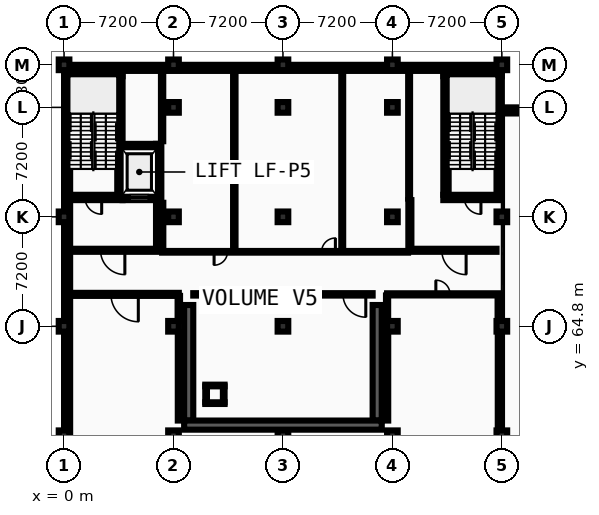
"""IFC4 building model, lengths in metres.
Left out: names, types, materials, properties, quantities, classifications, styles, units other than length and angle.
Written with IfcOpenShell. Run it as: python <this file> out.ifc"""

import sys

from ifc_helpers import new_model, si_unit, direction, frame, frame_2d, origin, origin_2d, place, context, subcontext, project, spatial, rectangle, extrude, element, fill, save


model = new_model("IFC4")
c1 = context("Model", 3, precision=1e-05, world=origin(), true_north=direction((0.0, 1.0)))
c2 = subcontext(c1, "Body", "Model", "MODEL_VIEW")
j1 = project(units=[si_unit("LENGTHUNIT", "METRE"), si_unit("PLANEANGLEUNIT", "RADIAN")], contexts=[c1])
p1 = place(None, origin())
s1 = spatial("IfcSite", under=j1, at=p1, CompositionType="ELEMENT")
p2 = place(p1, origin())
s2 = spatial("IfcBuilding", under=s1, at=p2, CompositionType="ELEMENT")
p3 = place(p2, frame((0.0, 0.0, -4.8)))
s3 = spatial("IfcBuildingStorey", under=s2, at=p3, CompositionType="ELEMENT", Elevation=-4.8)
for number, where, z_axis, x_axis in (
    (1, (0.0, 57.6, 0.0), (0.0, 0.0, 1.0), (1.0, 0.0, 0.0)),
    (2, (0.0, 64.8, 0.0), (0.0, 0.0, 1.0), (1.0, 0.0, 0.0)),
    (3, (0.0, 72.0, 0.0), (0.0, 0.0, 1.0), (1.0, 0.0, 0.0)),
    (4, (0.0, 82.0, 0.0), (0.0, 0.0, 1.0), (1.0, 0.0, 0.0)),
    (5, (7.2, 57.6, 0.0), (0.0, 0.0, 1.0), (1.0, 0.0, 0.0)),
    (6, (7.2, 64.8, 0.0), (0.0, 0.0, 1.0), (1.0, 0.0, 0.0)),
    (7, (7.2, 72.0, 0.0), (0.0, 0.0, 1.0), (1.0, 0.0, 0.0)),
    (8, (7.2, 79.2, 0.0), (0.0, 0.0, 1.0), (1.0, 0.0, 0.0)),
    (9, (7.2, 82.0, 0.0), (0.0, 0.0, 1.0), (1.0, 0.0, 0.0)),
    (10, (14.4, 57.6, 0.0), (0.0, 0.0, 1.0), (1.0, 0.0, 0.0)),
    (11, (14.4, 64.8, 0.0), (0.0, 0.0, 1.0), (1.0, 0.0, 0.0)),
    (12, (14.4, 72.0, 0.0), (0.0, 0.0, 1.0), (1.0, 0.0, 0.0)),
    (13, (14.4, 79.2, 0.0), (0.0, 0.0, 1.0), (1.0, 0.0, 0.0)),
    (14, (14.4, 82.0, 0.0), (0.0, 0.0, 1.0), (1.0, 0.0, 0.0)),
    (15, (21.6, 57.6, 0.0), (0.0, 0.0, 1.0), (1.0, 0.0, 0.0)),
    (16, (21.6, 64.8, 0.0), (0.0, 0.0, 1.0), (1.0, 0.0, 0.0)),
    (17, (21.6, 72.0, 0.0), (0.0, 0.0, 1.0), (1.0, 0.0, 0.0)),
    (18, (21.6, 79.2, 0.0), (0.0, 0.0, 1.0), (1.0, 0.0, 0.0)),
    (19, (21.6, 82.0, 0.0), (0.0, 0.0, 1.0), (1.0, 0.0, 0.0)),
    (20, (28.8, 57.6, 0.0), (0.0, 0.0, 1.0), (1.0, 0.0, 0.0)),
    (21, (28.8, 64.8, 0.0), (0.0, 0.0, 1.0), (1.0, 0.0, 0.0)),
    (22, (28.8, 72.0, 0.0), (0.0, 0.0, 1.0), (1.0, 0.0, 0.0)),
    (23, (28.8, 82.0, 0.0), (0.0, 0.0, 1.0), (1.0, 0.0, 0.0)),
):
    element("IfcColumn", number, at=place(p3, frame(where, z_axis=z_axis, x_axis=x_axis)), inside=s3, PredefinedType="COLUMN", context=c2, shape_type="SweptSolid", body=[
        extrude(rectangle(XDim=0.7, YDim=0.7, at=origin_2d()), origin(), (0.0, 0.0, 1.0), 4.8),
    ])
p4 = place(p3, frame((36.4, 79.0, 0.0), z_axis=(0.0, 0.0, 1.0), x_axis=(-1.0, 0.0, 0.0)))
e24 = element("IfcWall", 24, at=p4, inside=s3, PredefinedType="USERDEFINED", context=c2, shape_type="SweptSolid", body=[
    extrude(rectangle(XDim=8.0, YDim=0.4, at=frame_2d((4.0, 0.0))), origin(), (0.0, 0.0, 1.0), 4.545),
])
p5 = place(p3, frame((28.8, 81.8, 0.0), z_axis=(0.0, 0.0, 1.0), x_axis=(-1.0, 0.0, 0.0)))
e25 = element("IfcWall", 25, at=p5, inside=s3, PredefinedType="USERDEFINED", context=c2, shape_type="SweptSolid", body=[
    extrude(rectangle(XDim=28.8, YDim=0.4, at=frame_2d((14.4, 0.0))), origin(), (0.0, 0.0, 1.0), 4.545),
])
p6 = place(p3, frame((0.2, 81.6, 0.0), z_axis=(0.0, 0.0, 1.0), x_axis=(0.0, -1.0, 0.0)))
e26 = element("IfcWall", 26, at=p6, inside=s3, PredefinedType="USERDEFINED", context=c2, shape_type="SweptSolid", body=[
    extrude(rectangle(XDim=81.2, YDim=0.4, at=frame_2d((40.6, 0.0))), origin(), (0.0, 0.0, 1.0), 4.545),
])
for number, where, z_axis, x_axis in (
    (27, (8.2, 58.6, 0.0), (0.0, 0.0, 1.0), (0.0, 1.0, 0.0)),
    (28, (20.6, 58.6, 0.0), (0.0, 0.0, 1.0), (0.0, 1.0, 0.0)),
):
    element("IfcWall", number, at=place(p3, frame(where, z_axis=z_axis, x_axis=x_axis)), inside=s3, PredefinedType="SHEAR", context=c2, shape_type="SweptSolid", body=[
        extrude(rectangle(XDim=7.6, YDim=0.6, at=frame_2d((3.8, 0.0))), origin(), (0.0, 0.0, 1.0), 4.5),
    ])
p7 = place(p3, frame((7.9, 58.3, 0.0), z_axis=(0.0, 0.0, 1.0), x_axis=(1.0, 0.0, 0.0)))
e29 = element("IfcWall", 29, at=p7, inside=s3, PredefinedType="SHEAR", context=c2, shape_type="SweptSolid", body=[
    extrude(rectangle(XDim=13.0, YDim=0.6, at=frame_2d((6.5, 0.0))), origin(), (0.0, 0.0, 1.0), 4.5),
])
p8 = place(p3, frame((0.0, 73.275, 0.0), z_axis=(0.0, 0.0, 1.0), x_axis=(1.0, 0.0, 0.0)))
e30 = element("IfcWall", 30, at=p8, inside=s3, PredefinedType="SHEAR", context=c2, shape_type="SweptSolid", body=[
    extrude(rectangle(XDim=3.85, YDim=0.35, at=frame_2d((1.925, 0.0))), origin(), (0.0, 0.0, 1.0), 4.545),
])
p9 = place(p8, frame((1.375, 0.0, 0.0)))
e31 = element("IfcOpeningElement", 31, at=p9, cuts=e30, PredefinedType="OPENING", context=c2, shape_type="SweptSolid", body=[
    extrude(rectangle(XDim=1.1, YDim=2.15, at=frame_2d((0.55, 1.075))), frame((0.0, 0.185, 0.0), z_axis=(0.0, -1.0, 0.0), x_axis=(1.0, 0.0, 0.0)), (0.0, 0.0, 1.0), 0.37),
])
p10 = place(p3, frame((0.0, 81.425, 0.0), z_axis=(0.0, 0.0, 1.0), x_axis=(1.0, 0.0, 0.0)))
e32 = element("IfcWall", 32, at=p10, inside=s3, PredefinedType="SHEAR", context=c2, shape_type="SweptSolid", body=[
    extrude(rectangle(XDim=3.85, YDim=0.35, at=frame_2d((1.925, 0.0))), origin(), (0.0, 0.0, 1.0), 4.545),
])
p11 = place(p3, frame((3.675, 73.45, 0.0), z_axis=(0.0, 0.0, 1.0), x_axis=(0.0, 1.0, 0.0)))
e33 = element("IfcWall", 33, at=p11, inside=s3, PredefinedType="SHEAR", context=c2, shape_type="SweptSolid", body=[
    extrude(rectangle(XDim=7.8, YDim=0.35, at=frame_2d((3.9, 0.0))), origin(), (0.0, 0.0, 1.0), 4.545),
])
p12 = place(p3, frame((3.85, 73.275, 0.0), z_axis=(0.0, 0.0, 1.0), x_axis=(1.0, 0.0, 0.0)))
e34 = element("IfcWall", 34, at=p12, inside=s3, PredefinedType="SHEAR", context=c2, shape_type="SweptSolid", body=[
    extrude(rectangle(XDim=2.2, YDim=0.35, at=frame_2d((1.1, 0.0))), origin(), (0.0, 0.0, 1.0), 4.545),
])
p13 = place(p12, frame((0.5, 0.0, 0.0)))
e35 = element("IfcOpeningElement", 35, at=p13, cuts=e34, PredefinedType="OPENING", context=c2, shape_type="SweptSolid", body=[
    extrude(rectangle(XDim=1.2, YDim=2.2, at=frame_2d((0.6, 1.1))), frame((0.0, 0.185, 0.0), z_axis=(0.0, -1.0, 0.0), x_axis=(1.0, 0.0, 0.0)), (0.0, 0.0, 1.0), 0.37),
])
p14 = place(p3, frame((3.85, 76.625, 0.0), z_axis=(0.0, 0.0, 1.0), x_axis=(1.0, 0.0, 0.0)))
e36 = element("IfcWall", 36, at=p14, inside=s3, PredefinedType="SHEAR", context=c2, shape_type="SweptSolid", body=[
    extrude(rectangle(XDim=2.2, YDim=0.35, at=frame_2d((1.1, 0.0))), origin(), (0.0, 0.0, 1.0), 4.545),
])
p15 = place(p3, frame((6.225, 73.1, 0.0), z_axis=(0.0, 0.0, 1.0), x_axis=(0.0, 1.0, 0.0)))
e37 = element("IfcWall", 37, at=p15, inside=s3, PredefinedType="SHEAR", context=c2, shape_type="SweptSolid", body=[
    extrude(rectangle(XDim=3.7, YDim=0.35, at=frame_2d((1.85, 0.0))), origin(), (0.0, 0.0, 1.0), 4.545),
])
p16 = place(p3, frame((0.35, 69.8, 0.0), z_axis=(0.0, 0.0, 1.0), x_axis=(1.0, 0.0, 0.0)))
e38 = element("IfcWall", 38, at=p16, inside=s3, PredefinedType="PARTITIONING", context=c2, shape_type="SweptSolid", body=[
    extrude(rectangle(XDim=5.7, YDim=0.2, at=frame_2d((2.85, 0.0))), origin(), (0.0, 0.0, 1.0), 4.545),
])
p17 = place(p16, frame((2.05, 0.0, 0.0)))
e39 = element("IfcOpeningElement", 39, at=p17, cuts=e38, PredefinedType="OPENING", context=c2, shape_type="SweptSolid", body=[
    extrude(rectangle(XDim=1.6, YDim=2.2, at=frame_2d((0.8, 1.1))), frame((0.0, 0.11, 0.0), z_axis=(0.0, -1.0, 0.0), x_axis=(1.0, 0.0, 0.0)), (0.0, 0.0, 1.0), 0.22),
])
p18 = place(p3, frame((6.15, 69.9, 0.0), z_axis=(0.0, 0.0, 1.0), x_axis=(0.0, 1.0, 0.0)))
e40 = element("IfcWall", 40, at=p18, inside=s3, PredefinedType="PARTITIONING", context=c2, shape_type="SweptSolid", body=[
    extrude(rectangle(XDim=3.2, YDim=0.2, at=frame_2d((1.6, 0.0))), origin(), (0.0, 0.0, 1.0), 4.545),
])
p19 = place(p3, frame((24.95, 73.275, 0.0), z_axis=(0.0, 0.0, 1.0), x_axis=(1.0, 0.0, 0.0)))
e41 = element("IfcWall", 41, at=p19, inside=s3, PredefinedType="SHEAR", context=c2, shape_type="SweptSolid", body=[
    extrude(rectangle(XDim=3.85, YDim=0.35, at=frame_2d((1.925, 0.0))), origin(), (0.0, 0.0, 1.0), 4.545),
])
p20 = place(p19, frame((1.375, 0.0, 0.0)))
e42 = element("IfcOpeningElement", 42, at=p20, cuts=e41, PredefinedType="OPENING", context=c2, shape_type="SweptSolid", body=[
    extrude(rectangle(XDim=1.1, YDim=2.15, at=frame_2d((0.55, 1.075))), frame((0.0, 0.185, 0.0), z_axis=(0.0, -1.0, 0.0), x_axis=(1.0, 0.0, 0.0)), (0.0, 0.0, 1.0), 0.37),
])
p21 = place(p3, frame((24.95, 81.425, 0.0), z_axis=(0.0, 0.0, 1.0), x_axis=(1.0, 0.0, 0.0)))
e43 = element("IfcWall", 43, at=p21, inside=s3, PredefinedType="SHEAR", context=c2, shape_type="SweptSolid", body=[
    extrude(rectangle(XDim=3.85, YDim=0.35, at=frame_2d((1.925, 0.0))), origin(), (0.0, 0.0, 1.0), 4.545),
])
for number, where, z_axis, x_axis in (
    (44, (25.125, 73.45, 0.0), (0.0, 0.0, 1.0), (0.0, 1.0, 0.0)),
    (45, (28.625, 73.45, 0.0), (0.0, 0.0, 1.0), (0.0, 1.0, 0.0)),
):
    element("IfcWall", number, at=place(p3, frame(where, z_axis=z_axis, x_axis=x_axis)), inside=s3, PredefinedType="SHEAR", context=c2, shape_type="SweptSolid", body=[
        extrude(rectangle(XDim=7.8, YDim=0.35, at=frame_2d((3.9, 0.0))), origin(), (0.0, 0.0, 1.0), 4.545),
    ])
p22 = place(p3, frame((22.85, 69.8, 0.0), z_axis=(0.0, 0.0, 1.0), x_axis=(1.0, 0.0, 0.0)))
e46 = element("IfcWall", 46, at=p22, inside=s3, PredefinedType="PARTITIONING", context=c2, shape_type="SweptSolid", body=[
    extrude(rectangle(XDim=5.6, YDim=0.2, at=frame_2d((2.8, 0.0))), origin(), (0.0, 0.0, 1.0), 4.545),
])
p23 = place(p22, frame((2.0, 0.0, 0.0)))
e47 = element("IfcOpeningElement", 47, at=p23, cuts=e46, PredefinedType="OPENING", context=c2, shape_type="SweptSolid", body=[
    extrude(rectangle(XDim=1.6, YDim=2.2, at=frame_2d((0.8, 1.1))), frame((0.0, 0.11, 0.0), z_axis=(0.0, -1.0, 0.0), x_axis=(1.0, 0.0, 0.0)), (0.0, 0.0, 1.0), 0.22),
])
p24 = place(p3, frame((22.75, 69.9, 0.0), z_axis=(0.0, 0.0, 1.0), x_axis=(0.0, 1.0, 0.0)))
e48 = element("IfcWall", 48, at=p24, inside=s3, PredefinedType="PARTITIONING", context=c2, shape_type="SweptSolid", body=[
    extrude(rectangle(XDim=3.2, YDim=0.2, at=frame_2d((1.6, 0.0))), origin(), (0.0, 0.0, 1.0), 4.545),
])
for number, where, z_axis, x_axis in (
    (49, (9.29, 59.745, 0.0), (0.0, 0.0, 1.0), (1.0, 0.0, 0.0)),
    (50, (9.29, 60.905, 0.0), (0.0, 0.0, 1.0), (1.0, 0.0, 0.0)),
):
    element("IfcWall", number, at=place(p3, frame(where, z_axis=z_axis, x_axis=x_axis)), inside=s3, PredefinedType="PARTITIONING", context=c2, shape_type="SweptSolid", body=[
        extrude(rectangle(XDim=1.27, YDim=0.11, at=frame_2d((0.635, 0.0))), origin(), (0.0, 0.0, 1.0), 4.54),
    ])
for number, where, z_axis, x_axis in (
    (51, (9.345, 59.8, 0.0), (0.0, 0.0, 1.0), (0.0, 1.0, 0.0)),
    (52, (10.505, 59.8, 0.0), (0.0, 0.0, 1.0), (0.0, 1.0, 0.0)),
):
    element("IfcWall", number, at=place(p3, frame(where, z_axis=z_axis, x_axis=x_axis)), inside=s3, PredefinedType="PARTITIONING", context=c2, shape_type="SweptSolid", body=[
        extrude(rectangle(XDim=1.05, YDim=0.11, at=frame_2d((0.525, 0.0))), origin(), (0.0, 0.0, 1.0), 4.54),
    ])
p25 = place(p3, frame((0.42, 66.9, 0.0), z_axis=(0.0, 0.0, 1.0), x_axis=(1.0, 0.0, 0.0)))
e53 = element("IfcWall", 53, at=p25, inside=s3, PredefinedType="PARTITIONING", context=c2, shape_type="SweptSolid", body=[
    extrude(rectangle(XDim=7.13, YDim=0.2, at=frame_2d((3.565, 0.0))), origin(), (0.0, 0.0, 1.0), 4.545),
])
p26 = place(p25, frame((2.665, 0.0, 0.0)))
e54 = element("IfcOpeningElement", 54, at=p26, cuts=e53, PredefinedType="OPENING", context=c2, shape_type="SweptSolid", body=[
    extrude(rectangle(XDim=1.8, YDim=2.3, at=frame_2d((0.9, 1.15))), frame((0.0, 0.11, 0.0), z_axis=(0.0, -1.0, 0.0), x_axis=(1.0, 0.0, 0.0)), (0.0, 0.0, 1.0), 0.22),
])
p27 = place(p3, frame((8.5, 66.9, 0.0), z_axis=(0.0, 0.0, 1.0), x_axis=(1.0, 0.0, 0.0)))
e55 = element("IfcWall", 55, at=p27, inside=s3, PredefinedType="PARTITIONING", context=c2, shape_type="SweptSolid", body=[
    extrude(rectangle(XDim=11.8, YDim=0.158, at=frame_2d((5.9, 0.0))), origin(), (0.0, 0.0, 1.0), 4.545),
])
p28 = place(p27, frame((9.85, 0.0, 0.0)))
e56 = element("IfcOpeningElement", 56, at=p28, cuts=e55, PredefinedType="OPENING", context=c2, shape_type="SweptSolid", body=[
    extrude(rectangle(XDim=1.5, YDim=2.2, at=frame_2d((0.75, 1.1))), frame((0.0, 0.089, 0.0), z_axis=(0.0, -1.0, 0.0), x_axis=(1.0, 0.0, 0.0)), (0.0, 0.0, 1.0), 0.178),
])
p29 = place(p3, frame((21.25, 66.9, 0.0), z_axis=(0.0, 0.0, 1.0), x_axis=(1.0, 0.0, 0.0)))
e57 = element("IfcWall", 57, at=p29, inside=s3, PredefinedType="PARTITIONING", context=c2, shape_type="SweptSolid", body=[
    extrude(rectangle(XDim=7.35, YDim=0.142, at=frame_2d((3.675, 0.0))), origin(), (0.0, 0.0, 1.0), 4.545),
])
p30 = place(p29, frame((3.209, 0.0, 0.0)))
e58 = element("IfcOpeningElement", 58, at=p30, cuts=e57, PredefinedType="OPENING", context=c2, shape_type="SweptSolid", body=[
    extrude(rectangle(XDim=0.932, YDim=2.068, at=frame_2d((0.466, 1.034))), frame((0.0, 0.081, 0.0), z_axis=(0.0, -1.0, 0.0), x_axis=(1.0, 0.0, 0.0)), (0.0, 0.0, 1.0), 0.162),
])
p31 = place(p3, frame((6.45, 69.7, 0.0), z_axis=(0.0, 0.0, 1.0), x_axis=(1.0, 0.0, 0.0)))
e59 = element("IfcWall", 59, at=p31, inside=s3, PredefinedType="PARTITIONING", context=c2, shape_type="SweptSolid", body=[
    extrude(rectangle(XDim=16.18, YDim=0.11, at=frame_2d((8.09, 0.0))), origin(), (0.0, 0.0, 1.0), 4.545),
])
p32 = place(p31, frame((12.3, 0.0, 0.0)))
e60 = element("IfcOpeningElement", 60, at=p32, cuts=e59, PredefinedType="OPENING", context=c2, shape_type="SweptSolid", body=[
    extrude(rectangle(XDim=1.0, YDim=2.1, at=frame_2d((0.5, 1.05))), frame((0.0, 0.065, 0.0), z_axis=(0.0, -1.0, 0.0), x_axis=(1.0, 0.0, 0.0)), (0.0, 0.0, 1.0), 0.13),
])
p33 = place(p31, frame((3.42, 0.0, 0.0)))
e61 = element("IfcOpeningElement", 61, at=p33, cuts=e59, PredefinedType="OPENING", context=c2, shape_type="SweptSolid", body=[
    extrude(rectangle(XDim=0.88, YDim=2.068, at=frame_2d((0.44, 1.034))), frame((0.0, 0.065, 0.0), z_axis=(0.0, -1.0, 0.0), x_axis=(1.0, 0.0, 0.0)), (0.0, 0.0, 1.0), 0.13),
])
p34 = place(p31, frame((10.494, 0.0, 0.0)))
e62 = element("IfcOpeningElement", 62, at=p34, cuts=e59, PredefinedType="OPENING", context=c2, shape_type="SweptSolid", body=[
    extrude(rectangle(XDim=0.906, YDim=2.068, at=frame_2d((0.453, 1.034))), frame((0.0, 0.065, 0.0), z_axis=(0.0, -1.0, 0.0), x_axis=(1.0, 0.0, 0.0)), (0.0, 0.0, 1.0), 0.13),
])
p35 = place(p3, frame((6.45, 69.755, 0.0), z_axis=(0.0, 0.0, 1.0), x_axis=(0.0, 1.0, 0.0)))
e63 = element("IfcWall", 63, at=p35, inside=s3, PredefinedType="PARTITIONING", context=c2, shape_type="SweptSolid", body=[
    extrude(rectangle(XDim=3.17, YDim=0.16, at=frame_2d((1.585, 0.0))), origin(), (0.0, 0.0, 1.0), 4.545),
])
p36 = place(p3, frame((6.45, 76.975, 0.0), z_axis=(0.0, 0.0, 1.0), x_axis=(0.0, 1.0, 0.0)))
e64 = element("IfcWall", 64, at=p36, inside=s3, PredefinedType="PARTITIONING", context=c2, shape_type="SweptSolid", body=[
    extrude(rectangle(XDim=4.625, YDim=0.15, at=frame_2d((2.312, 0.0))), origin(), (0.0, 0.0, 1.0), 4.545),
])
p37 = place(p3, frame((7.55, 58.6, 0.0), z_axis=(0.0, 0.0, 1.0), x_axis=(0.0, 1.0, 0.0)))
e65 = element("IfcWall", 65, at=p37, inside=s3, PredefinedType="PARTITIONING", context=c2, shape_type="SweptSolid", body=[
    extrude(rectangle(XDim=5.82, YDim=0.135, at=frame_2d((2.91, 0.0))), origin(), (0.0, 0.0, 1.0), 4.545),
])
p38 = place(p3, frame((7.55, 65.18, 0.0), z_axis=(0.0, 0.0, 1.0), x_axis=(0.0, 1.0, 0.0)))
e66 = element("IfcWall", 66, at=p38, inside=s3, PredefinedType="PARTITIONING", context=c2, shape_type="SweptSolid", body=[
    extrude(rectangle(XDim=1.62, YDim=0.16, at=frame_2d((0.81, 0.0))), origin(), (0.0, 0.0, 1.0), 4.545),
])
p39 = place(p3, frame((11.2, 69.755, 0.0), z_axis=(0.0, 0.0, 1.0), x_axis=(0.0, 1.0, 0.0)))
e67 = element("IfcWall", 67, at=p39, inside=s3, PredefinedType="PARTITIONING", context=c2, shape_type="SweptSolid", body=[
    extrude(rectangle(XDim=11.845, YDim=0.16, at=frame_2d((5.923, 0.0))), origin(), (0.0, 0.0, 1.0), 4.545),
])
p40 = place(p3, frame((18.3, 69.755, 0.0), z_axis=(0.0, 0.0, 1.0), x_axis=(0.0, 1.0, 0.0)))
e68 = element("IfcWall", 68, at=p40, inside=s3, PredefinedType="PARTITIONING", context=c2, shape_type="SweptSolid", body=[
    extrude(rectangle(XDim=11.845, YDim=0.125, at=frame_2d((5.923, 0.0))), origin(), (0.0, 0.0, 1.0), 4.545),
])
p41 = place(p3, frame((21.25, 58.6, 0.0), z_axis=(0.0, 0.0, 1.0), x_axis=(0.0, 1.0, 0.0)))
e69 = element("IfcWall", 69, at=p41, inside=s3, PredefinedType="PARTITIONING", context=c2, shape_type="SweptSolid", body=[
    extrude(rectangle(XDim=5.82, YDim=0.15, at=frame_2d((2.91, 0.0))), origin(), (0.0, 0.0, 1.0), 4.545),
])
p42 = place(p3, frame((21.25, 65.18, 0.0), z_axis=(0.0, 0.0, 1.0), x_axis=(0.0, 1.0, 0.0)))
e70 = element("IfcWall", 70, at=p42, inside=s3, PredefinedType="PARTITIONING", context=c2, shape_type="SweptSolid", body=[
    extrude(rectangle(XDim=1.649, YDim=0.142, at=frame_2d((0.825, 0.0))), origin(), (0.0, 0.0, 1.0), 4.545),
])
p43 = place(p3, frame((22.7, 73.2, 0.0), z_axis=(0.0, 0.0, 1.0), x_axis=(0.0, 1.0, 0.0)))
e71 = element("IfcWall", 71, at=p43, inside=s3, PredefinedType="PARTITIONING", context=c2, shape_type="SweptSolid", body=[
    extrude(rectangle(XDim=8.4, YDim=0.125, at=frame_2d((4.2, 0.0))), origin(), (0.0, 0.0, 1.0), 4.545),
])
p44 = place(p3, frame((28.6, 57.98, 0.0), z_axis=(0.0, 0.0, 1.0), x_axis=(0.0, 1.0, 0.0)))
e72 = element("IfcWall", 72, at=p44, inside=s3, PredefinedType="PARTITIONING", context=c2, shape_type="SweptSolid", body=[
    extrude(rectangle(XDim=6.44, YDim=0.135, at=frame_2d((3.22, 0.0))), origin(), (0.0, 0.0, 1.0), 4.235),
])
p45 = place(p3, frame((28.6, 65.18, 0.0), z_axis=(0.0, 0.0, 1.0), x_axis=(0.0, 1.0, 0.0)))
e73 = element("IfcWall", 73, at=p45, inside=s3, PredefinedType="PARTITIONING", context=c2, shape_type="SweptSolid", body=[
    extrude(rectangle(XDim=1.649, YDim=0.16, at=frame_2d((0.825, 0.0))), origin(), (0.0, 0.0, 1.0), 4.235),
])
p46 = place(p9, origin())
e74 = element("IfcDoor", 74, at=p46, inside=s3, OperationType="SINGLE_SWING_RIGHT", PredefinedType="DOOR", context=c2, shape_type="SweptSolid", body=[
    extrude(rectangle(XDim=1.1, YDim=2.15, at=frame_2d((0.55, 1.075))), frame((0.0, 0.025, 0.0), z_axis=(0.0, -1.0, 0.0), x_axis=(1.0, 0.0, 0.0)), (0.0, 0.0, 1.0), 0.05),
])
fill(e31, e74)
p47 = place(p13, origin())
e75 = element("IfcDoor", 75, at=p47, inside=s3, OperationType="SLIDING_TO_RIGHT", PredefinedType="DOOR", context=c2, shape_type="SweptSolid", body=[
    extrude(rectangle(XDim=1.2, YDim=2.2, at=frame_2d((0.6, 1.1))), frame((0.0, 0.025, 0.0), z_axis=(0.0, -1.0, 0.0), x_axis=(1.0, 0.0, 0.0)), (0.0, 0.0, 1.0), 0.05),
])
fill(e35, e75)
p48 = place(p17, origin())
e76 = element("IfcDoor", 76, at=p48, inside=s3, OperationType="DOUBLE_DOOR_SINGLE_SWING", PredefinedType="DOOR", context=c2, shape_type="SweptSolid", body=[
    extrude(rectangle(XDim=1.6, YDim=2.2, at=frame_2d((0.8, 1.1))), frame((0.0, 0.025, 0.0), z_axis=(0.0, -1.0, 0.0), x_axis=(1.0, 0.0, 0.0)), (0.0, 0.0, 1.0), 0.05),
])
fill(e39, e76)
p49 = place(p20, origin())
e77 = element("IfcDoor", 77, at=p49, inside=s3, OperationType="SINGLE_SWING_RIGHT", PredefinedType="DOOR", context=c2, shape_type="SweptSolid", body=[
    extrude(rectangle(XDim=1.1, YDim=2.15, at=frame_2d((0.55, 1.075))), frame((0.0, 0.025, 0.0), z_axis=(0.0, -1.0, 0.0), x_axis=(1.0, 0.0, 0.0)), (0.0, 0.0, 1.0), 0.05),
])
fill(e42, e77)
p50 = place(p23, origin())
e78 = element("IfcDoor", 78, at=p50, inside=s3, OperationType="DOUBLE_DOOR_SINGLE_SWING", PredefinedType="DOOR", context=c2, shape_type="SweptSolid", body=[
    extrude(rectangle(XDim=1.6, YDim=2.2, at=frame_2d((0.8, 1.1))), frame((0.0, 0.025, 0.0), z_axis=(0.0, -1.0, 0.0), x_axis=(1.0, 0.0, 0.0)), (0.0, 0.0, 1.0), 0.05),
])
fill(e47, e78)
p51 = place(p28, origin())
e79 = element("IfcDoor", 79, at=p51, inside=s3, OperationType="DOUBLE_DOOR_SINGLE_SWING", PredefinedType="DOOR", context=c2, shape_type="SweptSolid", body=[
    extrude(rectangle(XDim=1.5, YDim=2.2, at=frame_2d((0.75, 1.1))), frame((0.0, 0.025, 0.0), z_axis=(0.0, -1.0, 0.0), x_axis=(1.0, 0.0, 0.0)), (0.0, 0.0, 1.0), 0.05),
])
fill(e56, e79)
p52 = place(p32, frame((1.0, 0.0, 0.0), z_axis=(0.0, 0.0, 1.0), x_axis=(-1.0, 0.0, 0.0)))
e80 = element("IfcDoor", 80, at=p52, inside=s3, OperationType="SLIDING_TO_LEFT", PredefinedType="DOOR", context=c2, shape_type="SweptSolid", body=[
    extrude(rectangle(XDim=1.0, YDim=2.1, at=frame_2d((0.5, 1.05))), frame((0.0, 0.025, 0.0), z_axis=(0.0, -1.0, 0.0), x_axis=(1.0, 0.0, 0.0)), (0.0, 0.0, 1.0), 0.05),
])
fill(e60, e80)
p53 = place(p33, frame((0.88, 0.0, 0.0), z_axis=(0.0, 0.0, 1.0), x_axis=(-1.0, 0.0, 0.0)))
e81 = element("IfcDoor", 81, at=p53, inside=s3, OperationType="SINGLE_SWING_LEFT", PredefinedType="DOOR", context=c2, shape_type="SweptSolid", body=[
    extrude(rectangle(XDim=0.88, YDim=2.068, at=frame_2d((0.44, 1.034))), frame((0.0, 0.025, 0.0), z_axis=(0.0, -1.0, 0.0), x_axis=(1.0, 0.0, 0.0)), (0.0, 0.0, 1.0), 0.05),
])
fill(e61, e81)
p54 = place(p34, frame((0.906, 0.0, 0.0), z_axis=(0.0, 0.0, 1.0), x_axis=(-1.0, 0.0, 0.0)))
e82 = element("IfcDoor", 82, at=p54, inside=s3, OperationType="SINGLE_SWING_RIGHT", PredefinedType="DOOR", context=c2, shape_type="SweptSolid", body=[
    extrude(rectangle(XDim=0.906, YDim=2.068, at=frame_2d((0.453, 1.034))), frame((0.0, 0.025, 0.0), z_axis=(0.0, -1.0, 0.0), x_axis=(1.0, 0.0, 0.0)), (0.0, 0.0, 1.0), 0.05),
])
fill(e62, e82)
p55 = place(p26, origin())
e83 = element("IfcDoor", 83, at=p55, inside=s3, OperationType="DOUBLE_DOOR_SINGLE_SWING", PredefinedType="DOOR", context=c2, shape_type="SweptSolid", body=[
    extrude(rectangle(XDim=1.8, YDim=2.3, at=frame_2d((0.9, 1.15))), frame((0.0, 0.025, 0.0), z_axis=(0.0, -1.0, 0.0), x_axis=(1.0, 0.0, 0.0)), (0.0, 0.0, 1.0), 0.05),
])
fill(e54, e83)
p56 = place(p30, origin())
e84 = element("IfcDoor", 84, at=p56, inside=s3, OperationType="SINGLE_SWING_LEFT", PredefinedType="DOOR", context=c2, shape_type="SweptSolid", body=[
    extrude(rectangle(XDim=0.932, YDim=2.068, at=frame_2d((0.466, 1.034))), frame((0.0, 0.025, 0.0), z_axis=(0.0, -1.0, 0.0), x_axis=(1.0, 0.0, 0.0)), (0.0, 0.0, 1.0), 0.05),
])
fill(e58, e84)
save(model, sys.argv[1])
